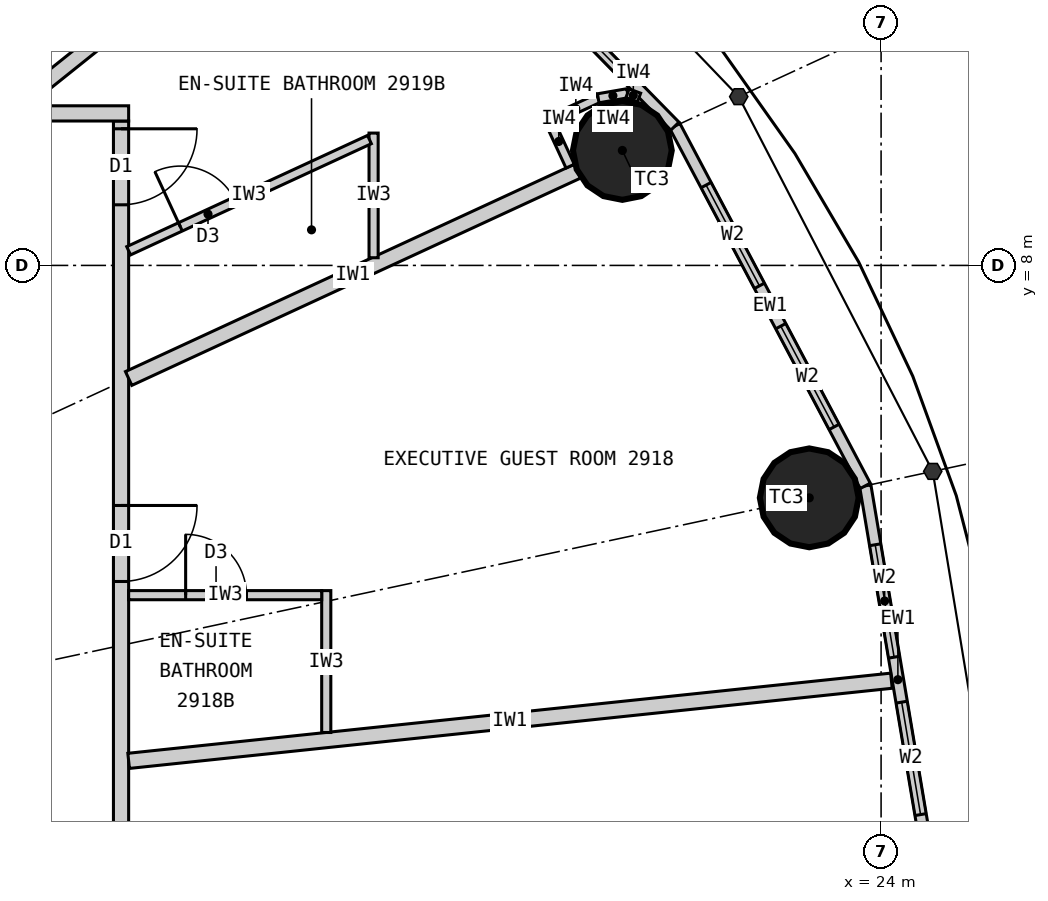
"""IFC4 building model, lengths in metres.
Left out: names, types, materials, properties, quantities, classifications, styles, units other than length and angle.
Written with IfcOpenShell. Run it as: python <this file> out.ifc"""

import sys

from ifc_helpers import new_model, si_unit, direction, frame, frame_2d, origin, origin_2d, place, context, subcontext, project, spatial, rectangle, circle, extrude, element, fill, save


model = new_model("IFC4")
c1 = context("Model", 3, precision=1e-05, world=origin(), true_north=direction((0.0, 1.0)))
c2 = subcontext(c1, "Body", "Model", "MODEL_VIEW")
j1 = project(units=[si_unit("LENGTHUNIT", "METRE"), si_unit("PLANEANGLEUNIT", "RADIAN")], contexts=[c1])
p1 = place(None, origin())
s1 = spatial("IfcSite", under=j1, at=p1, CompositionType="ELEMENT")
p2 = place(p1, origin())
s2 = spatial("IfcBuilding", under=s1, at=p2, CompositionType="ELEMENT")
p3 = place(p2, frame((0.0, 0.0, 115.5)))
s3 = spatial("IfcBuildingStorey", under=s2, at=p3, CompositionType="ELEMENT", Elevation=115.5)
for number, where, z_axis, x_axis in (
    (1, (23.055, 4.942, 0.0), (0.0, 0.0, 1.0), (1.0, 0.0, 0.0)),
    (2, (20.596, 9.513, 0.0), (0.0, 0.0, 1.0), (1.0, 0.0, 0.0)),
):
    element("IfcColumn", number, at=place(p3, frame(where, z_axis=z_axis, x_axis=x_axis)), inside=s3, PredefinedType="COLUMN", context=c2, shape_type="SweptSolid", body=[
        extrude(circle(Radius=0.65, at=origin_2d()), origin(), (0.0, 0.0, 1.0), 3.3),
    ])
p4 = place(p3, frame((24.65, 0.0, 0.0), z_axis=(0.0, 0.0, 1.0), x_axis=(-0.165883894218, 0.986145290329, 0.0)))
e3 = element("IfcWall", 3, at=p4, inside=s3, PredefinedType="ELEMENTEDWALL", context=c2, shape_type="SweptSolid", body=[
    extrude(rectangle(XDim=5.172, YDim=0.15, at=frame_2d((2.586, 0.0))), origin(), (0.0, 0.0, 1.0), 3.12),
])
p5 = place(p4, frame((0.786, 0.0, 0.9)))
e4 = element("IfcOpeningElement", 4, at=p5, cuts=e3, PredefinedType="OPENING", context=c2, shape_type="SweptSolid", body=[
    extrude(rectangle(XDim=1.5, YDim=1.9, at=frame_2d((0.75, 0.95))), frame((0.0, 0.085, 0.0), z_axis=(0.0, -1.0, 0.0), x_axis=(1.0, 0.0, 0.0)), (0.0, 0.0, 1.0), 0.17),
])
p6 = place(p4, frame((2.886, 0.0, 0.9)))
e5 = element("IfcOpeningElement", 5, at=p6, cuts=e3, PredefinedType="OPENING", context=c2, shape_type="SweptSolid", body=[
    extrude(rectangle(XDim=1.5, YDim=1.9, at=frame_2d((0.75, 0.95))), frame((0.0, 0.085, 0.0), z_axis=(0.0, -1.0, 0.0), x_axis=(1.0, 0.0, 0.0)), (0.0, 0.0, 1.0), 0.17),
])
p7 = place(p3, frame((23.792, 5.1, 0.0), z_axis=(0.0, 0.0, 1.0), x_axis=(-0.467814388454, 0.883826735257, 0.0)))
e6 = element("IfcWall", 6, at=p7, inside=s3, PredefinedType="ELEMENTEDWALL", context=c2, shape_type="SweptSolid", body=[
    extrude(rectangle(XDim=5.354, YDim=0.15, at=frame_2d((2.677, 0.0))), origin(), (0.0, 0.0, 1.0), 3.12),
])
p8 = place(p7, frame((0.877, 0.0, 0.9)))
e7 = element("IfcOpeningElement", 7, at=p8, cuts=e6, PredefinedType="OPENING", context=c2, shape_type="SweptSolid", body=[
    extrude(rectangle(XDim=1.5, YDim=1.9, at=frame_2d((0.75, 0.95))), frame((0.0, 0.085, 0.0), z_axis=(0.0, -1.0, 0.0), x_axis=(1.0, 0.0, 0.0)), (0.0, 0.0, 1.0), 0.17),
])
p9 = place(p7, frame((2.977, 0.0, 0.9)))
e8 = element("IfcOpeningElement", 8, at=p9, cuts=e6, PredefinedType="OPENING", context=c2, shape_type="SweptSolid", body=[
    extrude(rectangle(XDim=1.5, YDim=1.9, at=frame_2d((0.75, 0.95))), frame((0.0, 0.085, 0.0), z_axis=(0.0, -1.0, 0.0), x_axis=(1.0, 0.0, 0.0)), (0.0, 0.0, 1.0), 0.17),
])
p10 = place(p3, frame((21.287, 9.832, 0.0), z_axis=(0.0, 0.0, 1.0), x_axis=(-0.700136650834, 0.714008872605, 0.0)))
e9 = element("IfcWall", 9, at=p10, inside=s3, PredefinedType="ELEMENTEDWALL", context=c2, shape_type="SweptSolid", body=[
    extrude(rectangle(XDim=5.649, YDim=0.15, at=frame_2d((2.825, 0.0))), origin(), (0.0, 0.0, 1.0), 3.12),
])
p11 = place(p10, frame((1.025, 0.0, 0.9)))
e10 = element("IfcOpeningElement", 10, at=p11, cuts=e9, PredefinedType="OPENING", context=c2, shape_type="SweptSolid", body=[
    extrude(rectangle(XDim=1.5, YDim=1.9, at=frame_2d((0.75, 0.95))), frame((0.0, 0.085, 0.0), z_axis=(0.0, -1.0, 0.0), x_axis=(1.0, 0.0, 0.0)), (0.0, 0.0, 1.0), 0.17),
])
p12 = place(p10, frame((3.125, 0.0, 0.9)))
e11 = element("IfcOpeningElement", 11, at=p12, cuts=e9, PredefinedType="OPENING", context=c2, shape_type="SweptSolid", body=[
    extrude(rectangle(XDim=1.5, YDim=1.9, at=frame_2d((0.75, 0.95))), frame((0.0, 0.085, 0.0), z_axis=(0.0, -1.0, 0.0), x_axis=(1.0, 0.0, 0.0)), (0.0, 0.0, 1.0), 0.17),
])
p13 = place(p3, frame((14.0, -9.9, 0.0), z_axis=(0.0, 0.0, 1.0), x_axis=(0.0, 1.0, 0.0)))
e12 = element("IfcWall", 12, at=p13, inside=s3, PredefinedType="PARTITIONING", context=c2, shape_type="SweptSolid", body=[
    extrude(rectangle(XDim=19.8, YDim=0.2, at=frame_2d((9.9, 0.0))), origin(), (0.0, 0.0, 1.0), 3.12),
])
p14 = place(p13, frame((3.318, 0.0, 0.0)))
e13 = element("IfcOpeningElement", 13, at=p14, cuts=e12, PredefinedType="OPENING", context=c2, shape_type="SweptSolid", body=[
    extrude(rectangle(XDim=1.0, YDim=2.2, at=frame_2d((0.5, 1.1))), frame((0.0, 0.11, 0.0), z_axis=(0.0, -1.0, 0.0), x_axis=(1.0, 0.0, 0.0)), (0.0, 0.0, 1.0), 0.22),
])
p15 = place(p13, frame((9.238, 0.0, 0.0)))
e14 = element("IfcOpeningElement", 14, at=p15, cuts=e12, PredefinedType="OPENING", context=c2, shape_type="SweptSolid", body=[
    extrude(rectangle(XDim=1.0, YDim=2.2, at=frame_2d((0.5, 1.1))), frame((0.0, 0.11, 0.0), z_axis=(0.0, -1.0, 0.0), x_axis=(1.0, 0.0, 0.0)), (0.0, 0.0, 1.0), 0.22),
])
p16 = place(p13, frame((13.742, 0.0, 0.0)))
e15 = element("IfcOpeningElement", 15, at=p16, cuts=e12, PredefinedType="OPENING", context=c2, shape_type="SweptSolid", body=[
    extrude(rectangle(XDim=1.0, YDim=2.2, at=frame_2d((0.5, 1.1))), frame((0.0, 0.11, 0.0), z_axis=(0.0, -1.0, 0.0), x_axis=(1.0, 0.0, 0.0)), (0.0, 0.0, 1.0), 0.22),
])
p17 = place(p13, frame((18.698, 0.0, 0.0)))
e16 = element("IfcOpeningElement", 16, at=p17, cuts=e12, PredefinedType="OPENING", context=c2, shape_type="SweptSolid", body=[
    extrude(rectangle(XDim=1.0, YDim=2.2, at=frame_2d((0.5, 1.1))), frame((0.0, 0.11, 0.0), z_axis=(0.0, -1.0, 0.0), x_axis=(1.0, 0.0, 0.0)), (0.0, 0.0, 1.0), 0.22),
])
p18 = place(p3, frame((5.139, 10.0, 0.0), z_axis=(0.0, 0.0, 1.0), x_axis=(1.0, 0.0, 0.0)))
e17 = element("IfcWall", 17, at=p18, inside=s3, PredefinedType="PARTITIONING", context=c2, shape_type="SweptSolid", body=[
    extrude(rectangle(XDim=8.961, YDim=0.2, at=frame_2d((4.48, 0.0))), origin(), (0.0, 0.0, 1.0), 3.12),
])
p19 = place(p3, frame((14.1, 1.482, 0.0), z_axis=(0.0, 0.0, 1.0), x_axis=(0.994523202615, 0.104516024894, 0.0)))
e18 = element("IfcWall", 18, at=p19, inside=s3, PredefinedType="PARTITIONING", context=c2, shape_type="SweptSolid", body=[
    extrude(rectangle(XDim=10.091, YDim=0.2, at=frame_2d((5.045, 0.0))), origin(), (0.0, 0.0, 1.0), 2.47),
])
p20 = place(p3, frame((14.1, 6.512, 0.0), z_axis=(0.0, 0.0, 1.0), x_axis=(0.907833019998, 0.419331858797, 0.0)))
e19 = element("IfcWall", 19, at=p20, inside=s3, PredefinedType="PARTITIONING", context=c2, shape_type="SweptSolid", body=[
    extrude(rectangle(XDim=6.505, YDim=0.2, at=frame_2d((3.252, 0.0))), origin(), (0.0, 0.0, 1.0), 2.27),
])
p21 = place(p3, frame((12.625, 10.1, 0.0), z_axis=(0.0, 0.0, 1.0), x_axis=(0.780863644897, 0.624701503182, 0.0)))
e20 = element("IfcWall", 20, at=p21, inside=s3, PredefinedType="PARTITIONING", context=c2, shape_type="SweptSolid", body=[
    extrude(rectangle(XDim=4.612, YDim=0.2, at=frame_2d((2.306, 0.0))), origin(), (0.0, 0.0, 1.0), 2.37),
])
p22 = place(p3, frame((16.7, 1.855, 0.0), z_axis=(0.0, 0.0, 1.0), x_axis=(0.0, 1.0, 0.0)))
e21 = element("IfcWall", 21, at=p22, inside=s3, PredefinedType="PARTITIONING", context=c2, shape_type="SweptSolid", body=[
    extrude(rectangle(XDim=1.867, YDim=0.12, at=frame_2d((0.933, 0.0))), origin(), (0.0, 0.0, 1.0), 3.12),
])
p23 = place(p3, frame((14.1, 3.662, 0.0), z_axis=(0.0, 0.0, 1.0), x_axis=(1.0, 0.0, 0.0)))
e22 = element("IfcWall", 22, at=p23, inside=s3, PredefinedType="PARTITIONING", context=c2, shape_type="SweptSolid", body=[
    extrude(rectangle(XDim=2.54, YDim=0.12, at=frame_2d((1.27, 0.0))), origin(), (0.0, 0.0, 1.0), 2.37),
])
p24 = place(p23, frame((0.75, 0.0, 0.0)))
e23 = element("IfcOpeningElement", 23, at=p24, cuts=e22, PredefinedType="OPENING", context=c2, shape_type="SweptSolid", body=[
    extrude(rectangle(XDim=0.8, YDim=2.1, at=frame_2d((0.4, 1.05))), frame((0.0, 0.07, 0.0), z_axis=(0.0, -1.0, 0.0), x_axis=(1.0, 0.0, 0.0)), (0.0, 0.0, 1.0), 0.14),
])
p25 = place(p3, frame((17.323, 8.101, 0.0), z_axis=(0.0, 0.0, 1.0), x_axis=(0.0, 1.0, 0.0)))
e24 = element("IfcWall", 24, at=p25, inside=s3, PredefinedType="PARTITIONING", context=c2, shape_type="SweptSolid", body=[
    extrude(rectangle(XDim=1.64, YDim=0.12, at=frame_2d((0.82, 0.0))), origin(), (0.0, 0.0, 1.0), 3.12),
])
p26 = place(p3, frame((14.1, 8.193, 0.0), z_axis=(0.0, 0.0, 1.0), x_axis=(0.907836493557, 0.419324338628, 0.0)))
e25 = element("IfcWall", 25, at=p26, inside=s3, PredefinedType="PARTITIONING", context=c2, shape_type="SweptSolid", body=[
    extrude(rectangle(XDim=3.49, YDim=0.12, at=frame_2d((1.745, 0.0))), origin(), (0.0, 0.0, 1.0), 3.12),
])
p27 = place(p26, frame((0.75, 0.0, 0.0)))
e26 = element("IfcOpeningElement", 26, at=p27, cuts=e25, PredefinedType="OPENING", context=c2, shape_type="SweptSolid", body=[
    extrude(rectangle(XDim=0.8, YDim=2.1, at=frame_2d((0.4, 1.05))), frame((0.0, 0.07, 0.0), z_axis=(0.0, -1.0, 0.0), x_axis=(1.0, 0.0, 0.0)), (0.0, 0.0, 1.0), 0.14),
])
p28 = place(p3, frame((19.909, 9.306, 0.0), z_axis=(0.0, 0.0, 1.0), x_axis=(-0.419296148934, 0.90784951368, 0.0)))
e27 = element("IfcWall", 27, at=p28, inside=s3, PredefinedType="PARTITIONING", context=c2, shape_type="SweptSolid", body=[
    extrude(rectangle(XDim=0.716, YDim=0.12, at=frame_2d((0.358, 0.0))), origin(), (0.0, 0.0, 1.0), 3.12),
])
p29 = place(p3, frame((19.689, 9.926, 0.0), z_axis=(0.0, 0.0, 1.0), x_axis=(0.907893409272, 0.419201094227, 0.0)))
e28 = element("IfcWall", 28, at=p29, inside=s3, PredefinedType="PARTITIONING", context=c2, shape_type="SweptSolid", body=[
    extrude(rectangle(XDim=0.65, YDim=0.12, at=frame_2d((0.325, 0.0))), origin(), (0.0, 0.0, 1.0), 3.12),
])
p30 = place(p3, frame((20.279, 10.199, 0.0), z_axis=(0.0, 0.0, 1.0), x_axis=(0.985380740712, 0.170366651181, 0.0)))
e29 = element("IfcWall", 29, at=p30, inside=s3, PredefinedType="PARTITIONING", context=c2, shape_type="SweptSolid", body=[
    extrude(rectangle(XDim=0.391, YDim=0.12, at=frame_2d((0.196, 0.0))), origin(), (0.0, 0.0, 1.0), 3.12),
])
p31 = place(p3, frame((20.664, 10.265, 0.0), z_axis=(0.0, 0.0, 1.0), x_axis=(0.938058651481, -0.346476501918, 0.0)))
e30 = element("IfcWall", 30, at=p31, inside=s3, PredefinedType="PARTITIONING", context=c2, shape_type="SweptSolid", body=[
    extrude(rectangle(XDim=0.161, YDim=0.12, at=frame_2d((0.081, 0.0))), origin(), (0.0, 0.0, 1.0), 3.12),
])
p32 = place(p5, origin())
e31 = element("IfcWindow", 31, at=p32, inside=s3, PartitioningType="SINGLE_PANEL", PredefinedType="WINDOW", context=c2, shape_type="SweptSolid", body=[
    extrude(rectangle(XDim=1.5, YDim=1.9, at=frame_2d((0.75, 0.95))), frame((0.0, 0.03, 0.0), z_axis=(0.0, -1.0, 0.0), x_axis=(1.0, 0.0, 0.0)), (0.0, 0.0, 1.0), 0.06),
])
fill(e4, e31)
p33 = place(p6, origin())
e32 = element("IfcWindow", 32, at=p33, inside=s3, PartitioningType="SINGLE_PANEL", PredefinedType="WINDOW", context=c2, shape_type="SweptSolid", body=[
    extrude(rectangle(XDim=1.5, YDim=1.9, at=frame_2d((0.75, 0.95))), frame((0.0, 0.03, 0.0), z_axis=(0.0, -1.0, 0.0), x_axis=(1.0, 0.0, 0.0)), (0.0, 0.0, 1.0), 0.06),
])
fill(e5, e32)
p34 = place(p8, origin())
e33 = element("IfcWindow", 33, at=p34, inside=s3, PartitioningType="SINGLE_PANEL", PredefinedType="WINDOW", context=c2, shape_type="SweptSolid", body=[
    extrude(rectangle(XDim=1.5, YDim=1.9, at=frame_2d((0.75, 0.95))), frame((0.0, 0.03, 0.0), z_axis=(0.0, -1.0, 0.0), x_axis=(1.0, 0.0, 0.0)), (0.0, 0.0, 1.0), 0.06),
])
fill(e7, e33)
p35 = place(p9, origin())
e34 = element("IfcWindow", 34, at=p35, inside=s3, PartitioningType="SINGLE_PANEL", PredefinedType="WINDOW", context=c2, shape_type="SweptSolid", body=[
    extrude(rectangle(XDim=1.5, YDim=1.9, at=frame_2d((0.75, 0.95))), frame((0.0, 0.03, 0.0), z_axis=(0.0, -1.0, 0.0), x_axis=(1.0, 0.0, 0.0)), (0.0, 0.0, 1.0), 0.06),
])
fill(e8, e34)
p36 = place(p11, origin())
e35 = element("IfcWindow", 35, at=p36, inside=s3, PartitioningType="SINGLE_PANEL", PredefinedType="WINDOW", context=c2, shape_type="SweptSolid", body=[
    extrude(rectangle(XDim=1.5, YDim=1.9, at=frame_2d((0.75, 0.95))), frame((0.0, 0.03, 0.0), z_axis=(0.0, -1.0, 0.0), x_axis=(1.0, 0.0, 0.0)), (0.0, 0.0, 1.0), 0.06),
])
fill(e10, e35)
p37 = place(p24, origin())
e36 = element("IfcDoor", 36, at=p37, inside=s3, OperationType="SINGLE_SWING_LEFT", PredefinedType="DOOR", context=c2, shape_type="SweptSolid", body=[
    extrude(rectangle(XDim=0.8, YDim=2.1, at=frame_2d((0.4, 1.05))), frame((0.0, 0.025, 0.0), z_axis=(0.0, -1.0, 0.0), x_axis=(1.0, 0.0, 0.0)), (0.0, 0.0, 1.0), 0.05),
])
fill(e23, e36)
p38 = place(p16, origin())
e37 = element("IfcDoor", 37, at=p38, inside=s3, OperationType="SINGLE_SWING_RIGHT", PredefinedType="DOOR", context=c2, shape_type="SweptSolid", body=[
    extrude(rectangle(XDim=1.0, YDim=2.2, at=frame_2d((0.5, 1.1))), frame((0.0, 0.025, 0.0), z_axis=(0.0, -1.0, 0.0), x_axis=(1.0, 0.0, 0.0)), (0.0, 0.0, 1.0), 0.05),
])
fill(e15, e37)
p39 = place(p27, origin())
e38 = element("IfcDoor", 38, at=p39, inside=s3, OperationType="SINGLE_SWING_LEFT", PredefinedType="DOOR", context=c2, shape_type="SweptSolid", body=[
    extrude(rectangle(XDim=0.8, YDim=2.1, at=frame_2d((0.4, 1.05))), frame((0.0, 0.025, 0.0), z_axis=(0.0, -1.0, 0.0), x_axis=(1.0, 0.0, 0.0)), (0.0, 0.0, 1.0), 0.05),
])
fill(e26, e38)
p40 = place(p17, origin())
e39 = element("IfcDoor", 39, at=p40, inside=s3, OperationType="SINGLE_SWING_RIGHT", PredefinedType="DOOR", context=c2, shape_type="SweptSolid", body=[
    extrude(rectangle(XDim=1.0, YDim=2.2, at=frame_2d((0.5, 1.1))), frame((0.0, 0.025, 0.0), z_axis=(0.0, -1.0, 0.0), x_axis=(1.0, 0.0, 0.0)), (0.0, 0.0, 1.0), 0.05),
])
fill(e16, e39)
save(model, sys.argv[1])
